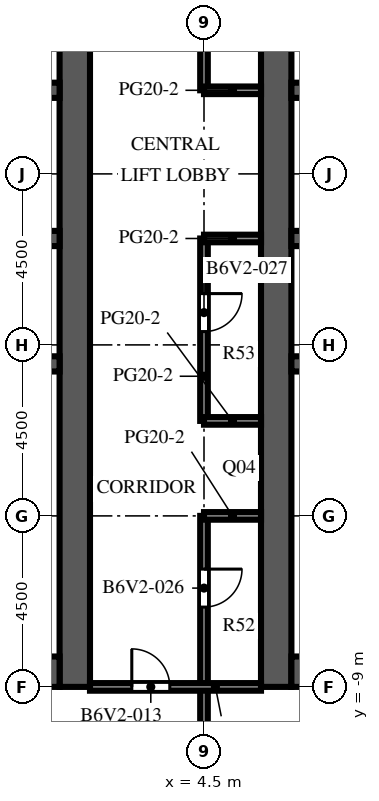
"""IFC4 building model, lengths in metres.
Left out: names, types, materials, properties, quantities, classifications, styles, units other than length and angle.
Written with IfcOpenShell. Run it as: python <this file> out.ifc"""

import sys

from ifc_helpers import new_model, si_unit, direction, frame, frame_2d, origin, place, context, subcontext, project, spatial, rectangle, extrude, element, fill, save


model = new_model("IFC4")
c1 = context("Model", 3, precision=1e-05, world=origin(), true_north=direction((0.0, 1.0)))
c2 = subcontext(c1, "Body", "Model", "MODEL_VIEW")
j1 = project(units=[si_unit("LENGTHUNIT", "METRE"), si_unit("PLANEANGLEUNIT", "RADIAN")], contexts=[c1])
p1 = place(None, origin())
s1 = spatial("IfcSite", under=j1, at=p1, CompositionType="ELEMENT")
p2 = place(p1, origin())
s2 = spatial("IfcBuilding", under=s1, at=p2, CompositionType="ELEMENT")
p3 = place(p2, frame((0.0, 0.0, 216.1)))
s3 = spatial("IfcBuildingStorey", under=s2, at=p3, CompositionType="ELEMENT", Elevation=216.1)
p4 = place(p3, frame((1.1, -9.0, 0.0), z_axis=(0.0, 0.0, 1.0), x_axis=(0.0, 1.0, 0.0)))
e1 = element("IfcWall", 1, at=p4, inside=s3, PredefinedType="SHEAR", context=c2, shape_type="SweptSolid", body=[
    extrude(rectangle(XDim=27.5, YDim=0.8, at=frame_2d((13.75, 0.0))), origin(), (0.0, 0.0, 1.0), 4.1),
])
p5 = place(p4, frame((12.55, 0.0, 0.0)))
e2 = element("IfcOpeningElement", 2, at=p5, cuts=e1, PredefinedType="OPENING", context=c2, shape_type="SweptSolid", body=[
    extrude(rectangle(XDim=2.4, YDim=2.4, at=frame_2d((1.2, 1.2))), frame((0.0, 0.41, 0.0), z_axis=(0.0, -1.0, 0.0), x_axis=(1.0, 0.0, 0.0)), (0.0, 0.0, 1.0), 0.82),
])
p6 = place(p4, frame((5.5, 0.0, 0.0)))
e3 = element("IfcOpeningElement", 3, at=p6, cuts=e1, PredefinedType="OPENING", context=c2, shape_type="SweptSolid", body=[
    extrude(rectangle(XDim=0.95, YDim=2.1, at=frame_2d((0.475, 1.05))), frame((0.0, 0.41, 0.0), z_axis=(0.0, -1.0, 0.0), x_axis=(1.0, 0.0, 0.0)), (0.0, 0.0, 1.0), 0.82),
])
p7 = place(p4, frame((23.475, 0.0, 0.0)))
e4 = element("IfcOpeningElement", 4, at=p7, cuts=e1, PredefinedType="OPENING", context=c2, shape_type="SweptSolid", body=[
    extrude(rectangle(XDim=1.2, YDim=2.1, at=frame_2d((0.6, 1.05))), frame((0.0, 0.41, 0.0), z_axis=(0.0, -1.0, 0.0), x_axis=(1.0, 0.0, 0.0)), (0.0, 0.0, 1.0), 0.82),
])
p8 = place(p3, frame((-9.7, -8.6, 0.0), z_axis=(0.0, 0.0, 1.0), x_axis=(1.0, 0.0, 0.0)))
e5 = element("IfcWall", 5, at=p8, inside=s3, PredefinedType="SHEAR", context=c2, shape_type="SweptSolid", body=[
    extrude(rectangle(XDim=10.4, YDim=0.8, at=frame_2d((5.2, 0.0))), origin(), (0.0, 0.0, 1.0), 4.1),
])
p9 = place(p3, frame((-9.7, -0.5, 0.0), z_axis=(0.0, 0.0, 1.0), x_axis=(1.0, 0.0, 0.0)))
e6 = element("IfcWall", 6, at=p9, inside=s3, PredefinedType="SHEAR", context=c2, shape_type="SweptSolid", body=[
    extrude(rectangle(XDim=10.4, YDim=0.4, at=frame_2d((5.2, 0.0))), origin(), (0.0, 0.0, 1.0), 4.1),
])
p10 = place(p3, frame((-9.7, 2.8, 0.0), z_axis=(0.0, 0.0, 1.0), x_axis=(1.0, 0.0, 0.0)))
e7 = element("IfcWall", 7, at=p10, inside=s3, PredefinedType="SHEAR", context=c2, shape_type="SweptSolid", body=[
    extrude(rectangle(XDim=10.4, YDim=0.4, at=frame_2d((5.2, 0.0))), origin(), (0.0, 0.0, 1.0), 4.1),
])
p11 = place(p10, frame((0.738, 0.0, 0.0)))
e8 = element("IfcOpeningElement", 8, at=p11, cuts=e7, PredefinedType="OPENING", context=c2, shape_type="SweptSolid", body=[
    extrude(rectangle(XDim=1.1, YDim=2.1, at=frame_2d((0.55, 1.05))), frame((0.0, 0.21, 0.0), z_axis=(0.0, -1.0, 0.0), x_axis=(1.0, 0.0, 0.0)), (0.0, 0.0, 1.0), 0.42),
])
p12 = place(p10, frame((3.337, 0.0, 0.0)))
e9 = element("IfcOpeningElement", 9, at=p12, cuts=e7, PredefinedType="OPENING", context=c2, shape_type="SweptSolid", body=[
    extrude(rectangle(XDim=1.1, YDim=2.1, at=frame_2d((0.55, 1.05))), frame((0.0, 0.21, 0.0), z_axis=(0.0, -1.0, 0.0), x_axis=(1.0, 0.0, 0.0)), (0.0, 0.0, 1.0), 0.42),
])
p13 = place(p10, frame((6.012, 0.0, 0.0)))
e10 = element("IfcOpeningElement", 10, at=p13, cuts=e7, PredefinedType="OPENING", context=c2, shape_type="SweptSolid", body=[
    extrude(rectangle(XDim=1.0, YDim=2.1, at=frame_2d((0.5, 1.05))), frame((0.0, 0.21, 0.0), z_axis=(0.0, -1.0, 0.0), x_axis=(1.0, 0.0, 0.0)), (0.0, 0.0, 1.0), 0.42),
])
p14 = place(p10, frame((8.613, 0.0, 0.0)))
e11 = element("IfcOpeningElement", 11, at=p14, cuts=e7, PredefinedType="OPENING", context=c2, shape_type="SweptSolid", body=[
    extrude(rectangle(XDim=1.0, YDim=2.1, at=frame_2d((0.5, 1.05))), frame((0.0, 0.21, 0.0), z_axis=(0.0, -1.0, 0.0), x_axis=(1.0, 0.0, 0.0)), (0.0, 0.0, 1.0), 0.42),
])
p15 = place(p3, frame((-9.7, 6.7, 0.0), z_axis=(0.0, 0.0, 1.0), x_axis=(1.0, 0.0, 0.0)))
e12 = element("IfcWall", 12, at=p15, inside=s3, PredefinedType="SHEAR", context=c2, shape_type="SweptSolid", body=[
    extrude(rectangle(XDim=10.4, YDim=0.4, at=frame_2d((5.2, 0.0))), origin(), (0.0, 0.0, 1.0), 4.1),
])
p16 = place(p15, frame((3.337, 0.0, 0.0)))
e13 = element("IfcOpeningElement", 13, at=p16, cuts=e12, PredefinedType="OPENING", context=c2, shape_type="SweptSolid", body=[
    extrude(rectangle(XDim=1.1, YDim=2.1, at=frame_2d((0.55, 1.05))), frame((0.0, 0.21, 0.0), z_axis=(0.0, -1.0, 0.0), x_axis=(1.0, 0.0, 0.0)), (0.0, 0.0, 1.0), 0.42),
])
p17 = place(p15, frame((5.962, 0.0, 0.0)))
e14 = element("IfcOpeningElement", 14, at=p17, cuts=e12, PredefinedType="OPENING", context=c2, shape_type="SweptSolid", body=[
    extrude(rectangle(XDim=1.1, YDim=2.1, at=frame_2d((0.55, 1.05))), frame((0.0, 0.21, 0.0), z_axis=(0.0, -1.0, 0.0), x_axis=(1.0, 0.0, 0.0)), (0.0, 0.0, 1.0), 0.42),
])
p18 = place(p15, frame((8.663, 0.0, 0.0)))
e15 = element("IfcOpeningElement", 15, at=p18, cuts=e12, PredefinedType="OPENING", context=c2, shape_type="SweptSolid", body=[
    extrude(rectangle(XDim=1.1, YDim=2.1, at=frame_2d((0.55, 1.05))), frame((0.0, 0.21, 0.0), z_axis=(0.0, -1.0, 0.0), x_axis=(1.0, 0.0, 0.0)), (0.0, 0.0, 1.0), 0.42),
])
p19 = place(p15, frame((0.688, 0.0, 0.0)))
e16 = element("IfcOpeningElement", 16, at=p19, cuts=e12, PredefinedType="OPENING", context=c2, shape_type="SweptSolid", body=[
    extrude(rectangle(XDim=1.0, YDim=2.1, at=frame_2d((0.5, 1.05))), frame((0.0, 0.21, 0.0), z_axis=(0.0, -1.0, 0.0), x_axis=(1.0, 0.0, 0.0)), (0.0, 0.0, 1.0), 0.42),
])
p20 = place(p3, frame((6.4, -9.0, 0.0), z_axis=(0.0, 0.0, 1.0), x_axis=(0.0, 1.0, 0.0)))
e17 = element("IfcWall", 17, at=p20, inside=s3, PredefinedType="SHEAR", context=c2, shape_type="SweptSolid", body=[
    extrude(rectangle(XDim=27.5, YDim=0.8, at=frame_2d((13.75, 0.0))), origin(), (0.0, 0.0, 1.0), 4.1),
])
p21 = place(p20, frame((12.55, 0.0, 0.0)))
e18 = element("IfcOpeningElement", 18, at=p21, cuts=e17, PredefinedType="OPENING", context=c2, shape_type="SweptSolid", body=[
    extrude(rectangle(XDim=2.4, YDim=2.4, at=frame_2d((1.2, 1.2))), frame((0.0, 0.41, 0.0), z_axis=(0.0, -1.0, 0.0), x_axis=(1.0, 0.0, 0.0)), (0.0, 0.0, 1.0), 0.82),
])
p22 = place(p20, frame((5.5, 0.0, 0.0)))
e19 = element("IfcOpeningElement", 19, at=p22, cuts=e17, PredefinedType="OPENING", context=c2, shape_type="SweptSolid", body=[
    extrude(rectangle(XDim=0.95, YDim=2.1, at=frame_2d((0.475, 1.05))), frame((0.0, 0.41, 0.0), z_axis=(0.0, -1.0, 0.0), x_axis=(1.0, 0.0, 0.0)), (0.0, 0.0, 1.0), 0.82),
])
p23 = place(p20, frame((23.475, 0.0, 0.0)))
e20 = element("IfcOpeningElement", 20, at=p23, cuts=e17, PredefinedType="OPENING", context=c2, shape_type="SweptSolid", body=[
    extrude(rectangle(XDim=1.2, YDim=2.1, at=frame_2d((0.6, 1.05))), frame((0.0, 0.41, 0.0), z_axis=(0.0, -1.0, 0.0), x_axis=(1.0, 0.0, 0.0)), (0.0, 0.0, 1.0), 0.82),
])
p24 = place(p3, frame((6.8, -8.6, 0.0), z_axis=(0.0, 0.0, 1.0), x_axis=(1.0, 0.0, 0.0)))
e21 = element("IfcWall", 21, at=p24, inside=s3, PredefinedType="SHEAR", context=c2, shape_type="SweptSolid", body=[
    extrude(rectangle(XDim=10.4, YDim=0.8, at=frame_2d((5.2, 0.0))), origin(), (0.0, 0.0, 1.0), 4.1),
])
p25 = place(p3, frame((6.8, -0.5, 0.0), z_axis=(0.0, 0.0, 1.0), x_axis=(1.0, 0.0, 0.0)))
e22 = element("IfcWall", 22, at=p25, inside=s3, PredefinedType="SHEAR", context=c2, shape_type="SweptSolid", body=[
    extrude(rectangle(XDim=10.4, YDim=0.4, at=frame_2d((5.2, 0.0))), origin(), (0.0, 0.0, 1.0), 4.1),
])
p26 = place(p3, frame((6.8, 2.8, 0.0), z_axis=(0.0, 0.0, 1.0), x_axis=(1.0, 0.0, 0.0)))
e23 = element("IfcWall", 23, at=p26, inside=s3, PredefinedType="SHEAR", context=c2, shape_type="SweptSolid", body=[
    extrude(rectangle(XDim=10.4, YDim=0.4, at=frame_2d((5.2, 0.0))), origin(), (0.0, 0.0, 1.0), 4.1),
])
p27 = place(p26, frame((0.738, 0.0, 0.0)))
e24 = element("IfcOpeningElement", 24, at=p27, cuts=e23, PredefinedType="OPENING", context=c2, shape_type="SweptSolid", body=[
    extrude(rectangle(XDim=1.1, YDim=2.1, at=frame_2d((0.55, 1.05))), frame((0.0, 0.21, 0.0), z_axis=(0.0, -1.0, 0.0), x_axis=(1.0, 0.0, 0.0)), (0.0, 0.0, 1.0), 0.42),
])
p28 = place(p26, frame((3.337, 0.0, 0.0)))
e25 = element("IfcOpeningElement", 25, at=p28, cuts=e23, PredefinedType="OPENING", context=c2, shape_type="SweptSolid", body=[
    extrude(rectangle(XDim=1.1, YDim=2.1, at=frame_2d((0.55, 1.05))), frame((0.0, 0.21, 0.0), z_axis=(0.0, -1.0, 0.0), x_axis=(1.0, 0.0, 0.0)), (0.0, 0.0, 1.0), 0.42),
])
p29 = place(p26, frame((6.012, 0.0, 0.0)))
e26 = element("IfcOpeningElement", 26, at=p29, cuts=e23, PredefinedType="OPENING", context=c2, shape_type="SweptSolid", body=[
    extrude(rectangle(XDim=1.0, YDim=2.1, at=frame_2d((0.5, 1.05))), frame((0.0, 0.21, 0.0), z_axis=(0.0, -1.0, 0.0), x_axis=(1.0, 0.0, 0.0)), (0.0, 0.0, 1.0), 0.42),
])
p30 = place(p26, frame((8.613, 0.0, 0.0)))
e27 = element("IfcOpeningElement", 27, at=p30, cuts=e23, PredefinedType="OPENING", context=c2, shape_type="SweptSolid", body=[
    extrude(rectangle(XDim=1.0, YDim=2.1, at=frame_2d((0.5, 1.05))), frame((0.0, 0.21, 0.0), z_axis=(0.0, -1.0, 0.0), x_axis=(1.0, 0.0, 0.0)), (0.0, 0.0, 1.0), 0.42),
])
p31 = place(p3, frame((6.8, 6.7, 0.0), z_axis=(0.0, 0.0, 1.0), x_axis=(1.0, 0.0, 0.0)))
e28 = element("IfcWall", 28, at=p31, inside=s3, PredefinedType="SHEAR", context=c2, shape_type="SweptSolid", body=[
    extrude(rectangle(XDim=10.4, YDim=0.4, at=frame_2d((5.2, 0.0))), origin(), (0.0, 0.0, 1.0), 4.1),
])
p32 = place(p31, frame((3.337, 0.0, 0.0)))
e29 = element("IfcOpeningElement", 29, at=p32, cuts=e28, PredefinedType="OPENING", context=c2, shape_type="SweptSolid", body=[
    extrude(rectangle(XDim=1.1, YDim=2.1, at=frame_2d((0.55, 1.05))), frame((0.0, 0.21, 0.0), z_axis=(0.0, -1.0, 0.0), x_axis=(1.0, 0.0, 0.0)), (0.0, 0.0, 1.0), 0.42),
])
p33 = place(p31, frame((5.962, 0.0, 0.0)))
e30 = element("IfcOpeningElement", 30, at=p33, cuts=e28, PredefinedType="OPENING", context=c2, shape_type="SweptSolid", body=[
    extrude(rectangle(XDim=1.1, YDim=2.1, at=frame_2d((0.55, 1.05))), frame((0.0, 0.21, 0.0), z_axis=(0.0, -1.0, 0.0), x_axis=(1.0, 0.0, 0.0)), (0.0, 0.0, 1.0), 0.42),
])
p34 = place(p31, frame((8.663, 0.0, 0.0)))
e31 = element("IfcOpeningElement", 31, at=p34, cuts=e28, PredefinedType="OPENING", context=c2, shape_type="SweptSolid", body=[
    extrude(rectangle(XDim=1.1, YDim=2.1, at=frame_2d((0.55, 1.05))), frame((0.0, 0.21, 0.0), z_axis=(0.0, -1.0, 0.0), x_axis=(1.0, 0.0, 0.0)), (0.0, 0.0, 1.0), 0.42),
])
p35 = place(p31, frame((0.688, 0.0, 0.0)))
e32 = element("IfcOpeningElement", 32, at=p35, cuts=e28, PredefinedType="OPENING", context=c2, shape_type="SweptSolid", body=[
    extrude(rectangle(XDim=1.0, YDim=2.1, at=frame_2d((0.5, 1.05))), frame((0.0, 0.21, 0.0), z_axis=(0.0, -1.0, 0.0), x_axis=(1.0, 0.0, 0.0)), (0.0, 0.0, 1.0), 0.42),
])
p36 = place(p3, frame((-1.8, -3.7, 0.0), z_axis=(0.0, 0.0, 1.0), x_axis=(1.0, 0.0, 0.0)))
e33 = element("IfcWall", 33, at=p36, inside=s3, PredefinedType="PARTITIONING", context=c2, shape_type="SweptSolid", body=[
    extrude(rectangle(XDim=2.5, YDim=0.1, at=frame_2d((1.25, 0.0))), origin(), (0.0, 0.0, 1.0), 3.5),
])
p37 = place(p36, frame((0.75, 0.0, 0.0)))
e34 = element("IfcOpeningElement", 34, at=p37, cuts=e33, PredefinedType="OPENING", context=c2, shape_type="SweptSolid", body=[
    extrude(rectangle(XDim=1.0, YDim=2.1, at=frame_2d((0.5, 1.05))), frame((0.0, 0.06, 0.0), z_axis=(0.0, -1.0, 0.0), x_axis=(1.0, 0.0, 0.0)), (0.0, 0.0, 1.0), 0.12),
])
p38 = place(p3, frame((-1.8, -2.35, 0.0), z_axis=(0.0, 0.0, 1.0), x_axis=(1.0, 0.0, 0.0)))
e35 = element("IfcWall", 35, at=p38, inside=s3, PredefinedType="PARTITIONING", context=c2, shape_type="SweptSolid", body=[
    extrude(rectangle(XDim=2.5, YDim=0.1, at=frame_2d((1.25, 0.0))), origin(), (0.0, 0.0, 1.0), 3.5),
])
p39 = place(p38, frame((0.75, 0.0, 0.0)))
e36 = element("IfcOpeningElement", 36, at=p39, cuts=e35, PredefinedType="OPENING", context=c2, shape_type="SweptSolid", body=[
    extrude(rectangle(XDim=1.0, YDim=2.1, at=frame_2d((0.5, 1.05))), frame((0.0, 0.06, 0.0), z_axis=(0.0, -1.0, 0.0), x_axis=(1.0, 0.0, 0.0)), (0.0, 0.0, 1.0), 0.12),
])
p40 = place(p3, frame((6.8, -3.7, 0.0), z_axis=(0.0, 0.0, 1.0), x_axis=(1.0, 0.0, 0.0)))
e37 = element("IfcWall", 37, at=p40, inside=s3, PredefinedType="PARTITIONING", context=c2, shape_type="SweptSolid", body=[
    extrude(rectangle(XDim=2.5, YDim=0.1, at=frame_2d((1.25, 0.0))), origin(), (0.0, 0.0, 1.0), 3.5),
])
p41 = place(p40, frame((0.75, 0.0, 0.0)))
e38 = element("IfcOpeningElement", 38, at=p41, cuts=e37, PredefinedType="OPENING", context=c2, shape_type="SweptSolid", body=[
    extrude(rectangle(XDim=1.0, YDim=2.1, at=frame_2d((0.5, 1.05))), frame((0.0, 0.06, 0.0), z_axis=(0.0, -1.0, 0.0), x_axis=(1.0, 0.0, 0.0)), (0.0, 0.0, 1.0), 0.12),
])
p42 = place(p3, frame((6.8, -2.35, 0.0), z_axis=(0.0, 0.0, 1.0), x_axis=(1.0, 0.0, 0.0)))
e39 = element("IfcWall", 39, at=p42, inside=s3, PredefinedType="PARTITIONING", context=c2, shape_type="SweptSolid", body=[
    extrude(rectangle(XDim=2.5, YDim=0.1, at=frame_2d((1.25, 0.0))), origin(), (0.0, 0.0, 1.0), 3.5),
])
p43 = place(p42, frame((0.75, 0.0, 0.0)))
e40 = element("IfcOpeningElement", 40, at=p43, cuts=e39, PredefinedType="OPENING", context=c2, shape_type="SweptSolid", body=[
    extrude(rectangle(XDim=1.0, YDim=2.1, at=frame_2d((0.5, 1.05))), frame((0.0, 0.06, 0.0), z_axis=(0.0, -1.0, 0.0), x_axis=(1.0, 0.0, 0.0)), (0.0, 0.0, 1.0), 0.12),
])
p44 = place(p3, frame((4.5, -4.5, 0.0), z_axis=(0.0, 0.0, 1.0), x_axis=(0.0, -1.0, 0.0)))
e41 = element("IfcWall", 41, at=p44, inside=s3, PredefinedType="PARTITIONING", context=c2, shape_type="SweptSolid", body=[
    extrude(rectangle(XDim=22.0, YDim=0.2, at=frame_2d((11.0, 0.0))), origin(), (0.0, 0.0, 1.0), 3.5),
])
p45 = place(p44, frame((1.4, 0.0, 0.0)))
e42 = element("IfcOpeningElement", 42, at=p45, cuts=e41, PredefinedType="OPENING", context=c2, shape_type="SweptSolid", body=[
    extrude(rectangle(XDim=1.0, YDim=2.1, at=frame_2d((0.5, 1.05))), frame((0.0, 0.11, 0.0), z_axis=(0.0, -1.0, 0.0), x_axis=(1.0, 0.0, 0.0)), (0.0, 0.0, 1.0), 0.22),
])
p46 = place(p3, frame((4.5, 2.8, 0.0), z_axis=(0.0, 0.0, 1.0), x_axis=(0.0, -1.0, 0.0)))
e43 = element("IfcWall", 43, at=p46, inside=s3, PredefinedType="PARTITIONING", context=c2, shape_type="SweptSolid", body=[
    extrude(rectangle(XDim=4.8, YDim=0.2, at=frame_2d((2.4, 0.0))), origin(), (0.0, 0.0, 1.0), 3.5),
])
p47 = place(p46, frame((1.45, 0.0, 0.0)))
e44 = element("IfcOpeningElement", 44, at=p47, cuts=e43, PredefinedType="OPENING", context=c2, shape_type="SweptSolid", body=[
    extrude(rectangle(XDim=1.0, YDim=2.1, at=frame_2d((0.5, 1.05))), frame((0.0, 0.11, 0.0), z_axis=(0.0, -1.0, 0.0), x_axis=(1.0, 0.0, 0.0)), (0.0, 0.0, 1.0), 0.22),
])
p48 = place(p3, frame((4.5, 26.5, 0.0), z_axis=(0.0, 0.0, 1.0), x_axis=(0.0, -1.0, 0.0)))
e45 = element("IfcWall", 45, at=p48, inside=s3, PredefinedType="PARTITIONING", context=c2, shape_type="SweptSolid", body=[
    extrude(rectangle(XDim=19.8, YDim=0.2, at=frame_2d((9.9, 0.0))), origin(), (0.0, 0.0, 1.0), 3.5),
])
p49 = place(p48, frame((13.45, 0.0, 0.0)))
e46 = element("IfcOpeningElement", 46, at=p49, cuts=e45, PredefinedType="OPENING", context=c2, shape_type="SweptSolid", body=[
    extrude(rectangle(XDim=1.0, YDim=2.1, at=frame_2d((0.5, 1.05))), frame((0.0, 0.11, 0.0), z_axis=(0.0, -1.0, 0.0), x_axis=(1.0, 0.0, 0.0)), (0.0, 0.0, 1.0), 0.22),
])
p50 = place(p3, frame((6.0, -9.0, 0.0), z_axis=(0.0, 0.0, 1.0), x_axis=(-1.0, 0.0, 0.0)))
e47 = element("IfcWall", 47, at=p50, inside=s3, PredefinedType="PARTITIONING", context=c2, shape_type="SweptSolid", body=[
    extrude(rectangle(XDim=4.5, YDim=0.2, at=frame_2d((2.25, 0.0))), origin(), (0.0, 0.0, 1.0), 3.5),
])
p51 = place(p50, frame((2.4, 0.0, 0.0)))
e48 = element("IfcOpeningElement", 48, at=p51, cuts=e47, PredefinedType="OPENING", context=c2, shape_type="SweptSolid", body=[
    extrude(rectangle(XDim=1.0, YDim=2.1, at=frame_2d((0.5, 1.05))), frame((0.0, 0.11, 0.0), z_axis=(0.0, -1.0, 0.0), x_axis=(1.0, 0.0, 0.0)), (0.0, 0.0, 1.0), 0.22),
])
for number, where, z_axis, x_axis in (
    (49, (4.5, -4.5, 0.0), (0.0, 0.0, 1.0), (1.0, 0.0, 0.0)),
    (50, (4.5, -2.0, 0.0), (0.0, 0.0, 1.0), (1.0, 0.0, 0.0)),
    (51, (4.5, 2.8, 0.0), (0.0, 0.0, 1.0), (1.0, 0.0, 0.0)),
    (52, (4.5, 6.7, 0.0), (0.0, 0.0, 1.0), (1.0, 0.0, 0.0)),
):
    element("IfcWall", number, at=place(p3, frame(where, z_axis=z_axis, x_axis=x_axis)), inside=s3, PredefinedType="PARTITIONING", context=c2, shape_type="SweptSolid", body=[
        extrude(rectangle(XDim=1.5, YDim=0.2, at=frame_2d((0.75, 0.0))), origin(), (0.0, 0.0, 1.0), 3.5),
    ])
p52 = place(p5, origin())
e53 = element("IfcDoor", 53, at=p52, inside=s3, OperationType="DOUBLE_DOOR_DOUBLE_SWING", PredefinedType="DOOR", context=c2, shape_type="SweptSolid", body=[
    extrude(rectangle(XDim=2.4, YDim=2.4, at=frame_2d((1.2, 1.2))), frame((0.0, 0.025, 0.0), z_axis=(0.0, -1.0, 0.0), x_axis=(1.0, 0.0, 0.0)), (0.0, 0.0, 1.0), 0.05),
])
fill(e2, e53)
p53 = place(p21, origin())
e54 = element("IfcDoor", 54, at=p53, inside=s3, OperationType="DOUBLE_DOOR_DOUBLE_SWING", PredefinedType="DOOR", context=c2, shape_type="SweptSolid", body=[
    extrude(rectangle(XDim=2.4, YDim=2.4, at=frame_2d((1.2, 1.2))), frame((0.0, 0.025, 0.0), z_axis=(0.0, -1.0, 0.0), x_axis=(1.0, 0.0, 0.0)), (0.0, 0.0, 1.0), 0.05),
])
fill(e18, e54)
p54 = place(p6, origin())
e55 = element("IfcDoor", 55, at=p54, inside=s3, OperationType="SINGLE_SWING_LEFT", PredefinedType="DOOR", context=c2, shape_type="SweptSolid", body=[
    extrude(rectangle(XDim=0.95, YDim=2.1, at=frame_2d((0.475, 1.05))), frame((0.0, 0.375, 0.0), z_axis=(0.0, -1.0, 0.0), x_axis=(1.0, 0.0, 0.0)), (0.0, 0.0, 1.0), 0.05),
])
fill(e3, e55)
p55 = place(p22, origin())
e56 = element("IfcDoor", 56, at=p55, inside=s3, OperationType="SINGLE_SWING_RIGHT", PredefinedType="DOOR", context=c2, shape_type="SweptSolid", body=[
    extrude(rectangle(XDim=0.95, YDim=2.1, at=frame_2d((0.475, 1.05))), frame((0.0, -0.325, 0.0), z_axis=(0.0, -1.0, 0.0), x_axis=(1.0, 0.0, 0.0)), (0.0, 0.0, 1.0), 0.05),
])
fill(e19, e56)
p56 = place(p51, origin())
e57 = element("IfcDoor", 57, at=p56, inside=s3, OperationType="SINGLE_SWING_RIGHT", PredefinedType="DOOR", context=c2, shape_type="SweptSolid", body=[
    extrude(rectangle(XDim=1.0, YDim=2.1, at=frame_2d((0.5, 1.05))), frame((0.0, 0.025, 0.0), z_axis=(0.0, -1.0, 0.0), x_axis=(1.0, 0.0, 0.0)), (0.0, 0.0, 1.0), 0.05),
])
fill(e48, e57)
p57 = place(p45, origin())
e58 = element("IfcDoor", 58, at=p57, inside=s3, OperationType="SINGLE_SWING_LEFT", PredefinedType="DOOR", context=c2, shape_type="SweptSolid", body=[
    extrude(rectangle(XDim=1.0, YDim=2.1, at=frame_2d((0.5, 1.05))), frame((0.0, 0.025, 0.0), z_axis=(0.0, -1.0, 0.0), x_axis=(1.0, 0.0, 0.0)), (0.0, 0.0, 1.0), 0.05),
])
fill(e42, e58)
p58 = place(p47, origin())
e59 = element("IfcDoor", 59, at=p58, inside=s3, OperationType="SINGLE_SWING_LEFT", PredefinedType="DOOR", context=c2, shape_type="SweptSolid", body=[
    extrude(rectangle(XDim=1.0, YDim=2.1, at=frame_2d((0.5, 1.05))), frame((0.0, 0.025, 0.0), z_axis=(0.0, -1.0, 0.0), x_axis=(1.0, 0.0, 0.0)), (0.0, 0.0, 1.0), 0.05),
])
fill(e44, e59)
save(model, sys.argv[1])
